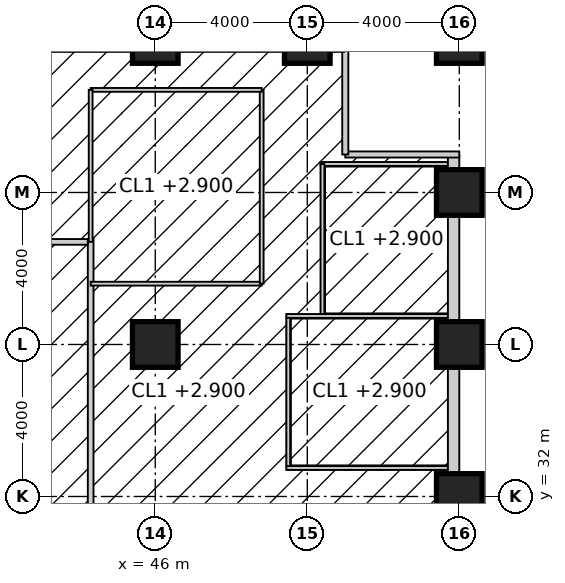
"""IFC4 building model, lengths in metres.
Left out: names, types, materials, properties, quantities, classifications, styles, units other than length and angle.
Written with IfcOpenShell. Run it as: python <this file> out.ifc"""

import sys

from ifc_helpers import new_model, si_unit, direction, frame, frame_2d, origin, origin_2d, place, context, subcontext, project, spatial, rectangle, hollow_rectangle, extrude, element, fill, save


model = new_model("IFC4")
c1 = context("Model", 3, precision=1e-05, world=origin(), true_north=direction((0.0, 1.0)))
c2 = subcontext(c1, "Body", "Model", "MODEL_VIEW")
j1 = project(units=[si_unit("LENGTHUNIT", "METRE"), si_unit("PLANEANGLEUNIT", "RADIAN")], contexts=[c1])
p1 = place(None, origin())
s1 = spatial("IfcSite", under=j1, at=p1, CompositionType="ELEMENT")
p2 = place(p1, origin())
s2 = spatial("IfcBuilding", under=s1, at=p2, CompositionType="ELEMENT")
p3 = place(p2, frame((0.0, 0.0, 19.0)))
s3 = spatial("IfcBuildingStorey", under=s2, at=p3, CompositionType="ELEMENT", Elevation=19.0)
for number, where, z_axis, x_axis in (
    (1, (46.0, 44.0, 0.0), (0.0, 0.0, 1.0), (1.0, 0.0, 0.0)),
    (2, (50.0, 44.0, 0.0), (0.0, 0.0, 1.0), (1.0, 0.0, 0.0)),
    (3, (54.0, 32.0, 0.0), (0.0, 0.0, 1.0), (1.0, 0.0, 0.0)),
    (4, (54.0, 36.0, 0.0), (0.0, 0.0, 1.0), (1.0, 0.0, 0.0)),
    (5, (54.0, 40.0, 0.0), (0.0, 0.0, 1.0), (1.0, 0.0, 0.0)),
    (6, (54.0, 44.0, 0.0), (0.0, 0.0, 1.0), (1.0, 0.0, 0.0)),
    (7, (46.0, 36.0, 0.0), (0.0, 0.0, 1.0), (1.0, 0.0, 0.0)),
):
    element("IfcColumn", number, at=place(p3, frame(where, z_axis=z_axis, x_axis=x_axis)), inside=s3, PredefinedType="COLUMN", context=c2, shape_type="SweptSolid", body=[
        extrude(hollow_rectangle(XDim=1.2, YDim=1.2, WallThickness=0.1, at=origin_2d()), origin(), (0.0, 0.0, 1.0), 4.0),
    ])
p4 = place(p3, frame((44.3, 15.225, 0.0), z_axis=(0.0, 0.0, 1.0), x_axis=(0.0, 1.0, 0.0)))
e8 = element("IfcWall", 8, at=p4, inside=s3, PredefinedType="PARTITIONING", context=c2, shape_type="SweptSolid", body=[
    extrude(rectangle(XDim=23.55, YDim=0.15, at=frame_2d((11.775, 0.0))), origin(), (0.0, 0.0, 1.0), 3.85),
])
p5 = place(p4, frame((5.575, 0.0, 0.0)))
e9 = element("IfcOpeningElement", 9, at=p5, cuts=e8, PredefinedType="OPENING", context=c2, shape_type="SweptSolid", body=[
    extrude(rectangle(XDim=1.8, YDim=2.4, at=frame_2d((0.9, 1.2))), frame((0.0, 0.085, 0.0), z_axis=(0.0, -1.0, 0.0), x_axis=(1.0, 0.0, 0.0)), (0.0, 0.0, 1.0), 0.17),
])
p6 = place(p4, frame((16.825, 0.0, 0.0)))
e10 = element("IfcOpeningElement", 10, at=p6, cuts=e8, PredefinedType="OPENING", context=c2, shape_type="SweptSolid", body=[
    extrude(rectangle(XDim=1.8, YDim=2.4, at=frame_2d((0.9, 1.2))), frame((0.0, 0.085, 0.0), z_axis=(0.0, -1.0, 0.0), x_axis=(1.0, 0.0, 0.0)), (0.0, 0.0, 1.0), 0.17),
])
p7 = place(p3, frame((15.775, 38.7, 0.0), z_axis=(0.0, 0.0, 1.0), x_axis=(1.0, 0.0, 0.0)))
e11 = element("IfcWall", 11, at=p7, inside=s3, PredefinedType="PARTITIONING", context=c2, shape_type="SweptSolid", body=[
    extrude(rectangle(XDim=28.45, YDim=0.15, at=frame_2d((14.225, 0.0))), origin(), (0.0, 0.0, 1.0), 3.85),
])
p8 = place(p7, frame((7.975, 0.0, 0.0)))
e12 = element("IfcOpeningElement", 12, at=p8, cuts=e11, PredefinedType="OPENING", context=c2, shape_type="SweptSolid", body=[
    extrude(rectangle(XDim=0.9, YDim=2.1, at=frame_2d((0.45, 1.05))), frame((0.0, 0.085, 0.0), z_axis=(0.0, -1.0, 0.0), x_axis=(1.0, 0.0, 0.0)), (0.0, 0.0, 1.0), 0.17),
])
p9 = place(p7, frame((11.725, 0.0, 0.0)))
e13 = element("IfcOpeningElement", 13, at=p9, cuts=e11, PredefinedType="OPENING", context=c2, shape_type="SweptSolid", body=[
    extrude(rectangle(XDim=1.0, YDim=2.1, at=frame_2d((0.5, 1.05))), frame((0.0, 0.085, 0.0), z_axis=(0.0, -1.0, 0.0), x_axis=(1.0, 0.0, 0.0)), (0.0, 0.0, 1.0), 0.17),
])
p10 = place(p7, frame((15.575, 0.0, 0.0)))
e14 = element("IfcOpeningElement", 14, at=p10, cuts=e11, PredefinedType="OPENING", context=c2, shape_type="SweptSolid", body=[
    extrude(rectangle(XDim=0.9, YDim=2.1, at=frame_2d((0.45, 1.05))), frame((0.0, 0.085, 0.0), z_axis=(0.0, -1.0, 0.0), x_axis=(1.0, 0.0, 0.0)), (0.0, 0.0, 1.0), 0.17),
])
for number, where, z_axis, x_axis in (
    (15, (49.45, 32.75, 0.0), (0.0, 0.0, 1.0), (1.0, 0.0, 0.0)),
    (16, (49.45, 36.75, 0.0), (0.0, 0.0, 1.0), (1.0, 0.0, 0.0)),
):
    element("IfcWall", number, at=place(p3, frame(where, z_axis=z_axis, x_axis=x_axis)), inside=s3, PredefinedType="PARTITIONING", context=c2, shape_type="SweptSolid", body=[
        extrude(rectangle(XDim=4.25, YDim=0.1, at=frame_2d((2.125, 0.0))), origin(), (0.0, 0.0, 1.0), 3.85),
    ])
p11 = place(p3, frame((50.35, 40.75, 0.0), z_axis=(0.0, 0.0, 1.0), x_axis=(1.0, 0.0, 0.0)))
e17 = element("IfcWall", 17, at=p11, inside=s3, PredefinedType="PARTITIONING", context=c2, shape_type="SweptSolid", body=[
    extrude(rectangle(XDim=3.35, YDim=0.1, at=frame_2d((1.675, 0.0))), origin(), (0.0, 0.0, 1.0), 3.85),
])
p12 = place(p3, frame((49.5, 32.8, 0.0), z_axis=(0.0, 0.0, 1.0), x_axis=(0.0, 1.0, 0.0)))
e18 = element("IfcWall", 18, at=p12, inside=s3, PredefinedType="PARTITIONING", context=c2, shape_type="SweptSolid", body=[
    extrude(rectangle(XDim=3.9, YDim=0.1, at=frame_2d((1.95, 0.0))), origin(), (0.0, 0.0, 1.0), 3.85),
])
p13 = place(p12, frame((1.45, 0.0, 0.0)))
e19 = element("IfcOpeningElement", 19, at=p13, cuts=e18, PredefinedType="OPENING", context=c2, shape_type="SweptSolid", body=[
    extrude(rectangle(XDim=1.0, YDim=2.2, at=frame_2d((0.5, 1.1))), frame((0.0, 0.06, 0.0), z_axis=(0.0, -1.0, 0.0), x_axis=(1.0, 0.0, 0.0)), (0.0, 0.0, 1.0), 0.12),
])
p14 = place(p3, frame((50.4, 36.8, 0.0), z_axis=(0.0, 0.0, 1.0), x_axis=(0.0, 1.0, 0.0)))
e20 = element("IfcWall", 20, at=p14, inside=s3, PredefinedType="PARTITIONING", context=c2, shape_type="SweptSolid", body=[
    extrude(rectangle(XDim=3.95, YDim=0.1, at=frame_2d((1.975, 0.0))), origin(), (0.0, 0.0, 1.0), 2.95),
])
p15 = place(p14, frame((1.45, 0.0, 0.0)))
e21 = element("IfcOpeningElement", 21, at=p15, cuts=e20, PredefinedType="OPENING", context=c2, shape_type="SweptSolid", body=[
    extrude(rectangle(XDim=1.0, YDim=2.2, at=frame_2d((0.5, 1.1))), frame((0.0, 0.06, 0.0), z_axis=(0.0, -1.0, 0.0), x_axis=(1.0, 0.0, 0.0)), (0.0, 0.0, 1.0), 0.12),
])
p16 = place(p3, frame((44.3, 37.6, 0.0), z_axis=(0.0, 0.0, 1.0), x_axis=(1.0, 0.0, 0.0)))
e22 = element("IfcWall", 22, at=p16, inside=s3, PredefinedType="PARTITIONING", context=c2, shape_type="SweptSolid", body=[
    extrude(rectangle(XDim=4.5, YDim=0.1, at=frame_2d((2.25, 0.0))), origin(), (0.0, 0.0, 1.0), 3.85),
])
p17 = place(p3, frame((48.8, 37.6, 0.0), z_axis=(0.0, 0.0, 1.0), x_axis=(0.0, 1.0, 0.0)))
e23 = element("IfcWall", 23, at=p17, inside=s3, PredefinedType="PARTITIONING", context=c2, shape_type="SweptSolid", body=[
    extrude(rectangle(XDim=5.1, YDim=0.1, at=frame_2d((2.55, 0.0))), origin(), (0.0, 0.0, 1.0), 3.85),
])
p18 = place(p17, frame((2.05, 0.0, 0.0)))
e24 = element("IfcOpeningElement", 24, at=p18, cuts=e23, PredefinedType="OPENING", context=c2, shape_type="SweptSolid", body=[
    extrude(rectangle(XDim=1.0, YDim=2.2, at=frame_2d((0.5, 1.1))), frame((0.0, 0.06, 0.0), z_axis=(0.0, -1.0, 0.0), x_axis=(1.0, 0.0, 0.0)), (0.0, 0.0, 1.0), 0.12),
])
p19 = place(p3, frame((48.8, 42.7, 0.0), z_axis=(0.0, 0.0, 1.0), x_axis=(-1.0, 0.0, 0.0)))
e25 = element("IfcWall", 25, at=p19, inside=s3, PredefinedType="PARTITIONING", context=c2, shape_type="SweptSolid", body=[
    extrude(rectangle(XDim=4.5, YDim=0.1, at=frame_2d((2.25, 0.0))), origin(), (0.0, 0.0, 1.0), 3.85),
])
p20 = place(p3, frame((44.3, 42.7, 0.0), z_axis=(0.0, 0.0, 1.0), x_axis=(0.0, -1.0, 0.0)))
e26 = element("IfcWall", 26, at=p20, inside=s3, PredefinedType="PARTITIONING", context=c2, shape_type="SweptSolid", body=[
    extrude(rectangle(XDim=4.0, YDim=0.1, at=frame_2d((2.0, 0.0))), origin(), (0.0, 0.0, 1.0), 3.85),
])
p21 = place(p3, frame((53.85, 32.6, 0.0), z_axis=(0.0, 0.0, 1.0), x_axis=(0.0, 1.0, 0.0)))
e27 = element("IfcWall", 27, at=p21, inside=s3, PredefinedType="ELEMENTEDWALL", context=c2, shape_type="SweptSolid", body=[
    extrude(rectangle(XDim=2.8, YDim=0.3, at=frame_2d((1.4, 0.0))), origin(), (0.0, 0.0, 1.0), 2.85),
])
p22 = place(p21, frame((0.4, 0.0, 0.8)))
e28 = element("IfcOpeningElement", 28, at=p22, cuts=e27, PredefinedType="OPENING", context=c2, shape_type="SweptSolid", body=[
    extrude(rectangle(XDim=2.0, YDim=2.0, at=frame_2d((1.0, 1.0))), frame((0.0, 0.16, 0.0), z_axis=(0.0, -1.0, 0.0), x_axis=(1.0, 0.0, 0.0)), (0.0, 0.0, 1.0), 0.32),
])
p23 = place(p3, frame((53.85, 36.6, 0.0), z_axis=(0.0, 0.0, 1.0), x_axis=(0.0, 1.0, 0.0)))
e29 = element("IfcWall", 29, at=p23, inside=s3, PredefinedType="ELEMENTEDWALL", context=c2, shape_type="SweptSolid", body=[
    extrude(rectangle(XDim=2.8, YDim=0.3, at=frame_2d((1.4, 0.0))), origin(), (0.0, 0.0, 1.0), 2.85),
])
p24 = place(p23, frame((0.4, 0.0, 0.8)))
e30 = element("IfcOpeningElement", 30, at=p24, cuts=e29, PredefinedType="OPENING", context=c2, shape_type="SweptSolid", body=[
    extrude(rectangle(XDim=2.0, YDim=2.0, at=frame_2d((1.0, 1.0))), frame((0.0, 0.16, 0.0), z_axis=(0.0, -1.0, 0.0), x_axis=(1.0, 0.0, 0.0)), (0.0, 0.0, 1.0), 0.32),
])
p25 = place(p3, frame((53.85, 40.6, 0.0), z_axis=(0.0, 0.0, 1.0), x_axis=(0.0, 1.0, 0.0)))
e31 = element("IfcWall", 31, at=p25, inside=s3, PredefinedType="ELEMENTEDWALL", context=c2, shape_type="SweptSolid", body=[
    extrude(rectangle(XDim=0.37, YDim=0.3, at=frame_2d((0.185, 0.0))), origin(), (0.0, 0.0, 1.0), 2.95),
])
p26 = place(p6, origin())
e32 = element("IfcDoor", 32, at=p26, inside=s3, OperationType="DOUBLE_DOOR_DOUBLE_SWING", PredefinedType="DOOR", context=c2, shape_type="SweptSolid", body=[
    extrude(rectangle(XDim=1.8, YDim=2.4, at=frame_2d((0.9, 1.2))), frame((0.0, 0.025, 0.0), z_axis=(0.0, -1.0, 0.0), x_axis=(1.0, 0.0, 0.0)), (0.0, 0.0, 1.0), 0.05),
])
fill(e10, e32)
p27 = place(p13, origin())
e33 = element("IfcDoor", 33, at=p27, inside=s3, OperationType="SINGLE_SWING_LEFT", PredefinedType="DOOR", context=c2, shape_type="SweptSolid", body=[
    extrude(rectangle(XDim=1.0, YDim=2.2, at=frame_2d((0.5, 1.1))), frame((0.0, 0.025, 0.0), z_axis=(0.0, -1.0, 0.0), x_axis=(1.0, 0.0, 0.0)), (0.0, 0.0, 1.0), 0.05),
])
fill(e19, e33)
p28 = place(p15, origin())
e34 = element("IfcDoor", 34, at=p28, inside=s3, OperationType="SINGLE_SWING_LEFT", PredefinedType="DOOR", context=c2, shape_type="SweptSolid", body=[
    extrude(rectangle(XDim=1.0, YDim=2.2, at=frame_2d((0.5, 1.1))), frame((0.0, 0.025, 0.0), z_axis=(0.0, -1.0, 0.0), x_axis=(1.0, 0.0, 0.0)), (0.0, 0.0, 1.0), 0.05),
])
fill(e21, e34)
p29 = place(p18, origin())
e35 = element("IfcDoor", 35, at=p29, inside=s3, OperationType="SINGLE_SWING_RIGHT", PredefinedType="DOOR", context=c2, shape_type="SweptSolid", body=[
    extrude(rectangle(XDim=1.0, YDim=2.2, at=frame_2d((0.5, 1.1))), frame((0.0, 0.025, 0.0), z_axis=(0.0, -1.0, 0.0), x_axis=(1.0, 0.0, 0.0)), (0.0, 0.0, 1.0), 0.05),
])
fill(e24, e35)
p30 = place(p22, origin())
e36 = element("IfcWindow", 36, at=p30, inside=s3, PartitioningType="SINGLE_PANEL", PredefinedType="WINDOW", context=c2, shape_type="SweptSolid", body=[
    extrude(rectangle(XDim=2.0, YDim=2.0, at=frame_2d((1.0, 1.0))), frame((0.0, 0.03, 0.0), z_axis=(0.0, -1.0, 0.0), x_axis=(1.0, 0.0, 0.0)), (0.0, 0.0, 1.0), 0.06),
])
fill(e28, e36)
p31 = place(p24, origin())
e37 = element("IfcWindow", 37, at=p31, inside=s3, PartitioningType="SINGLE_PANEL", PredefinedType="WINDOW", context=c2, shape_type="SweptSolid", body=[
    extrude(rectangle(XDim=2.0, YDim=2.0, at=frame_2d((1.0, 1.0))), frame((0.0, 0.03, 0.0), z_axis=(0.0, -1.0, 0.0), x_axis=(1.0, 0.0, 0.0)), (0.0, 0.0, 1.0), 0.06),
])
fill(e30, e37)
save(model, sys.argv[1])
